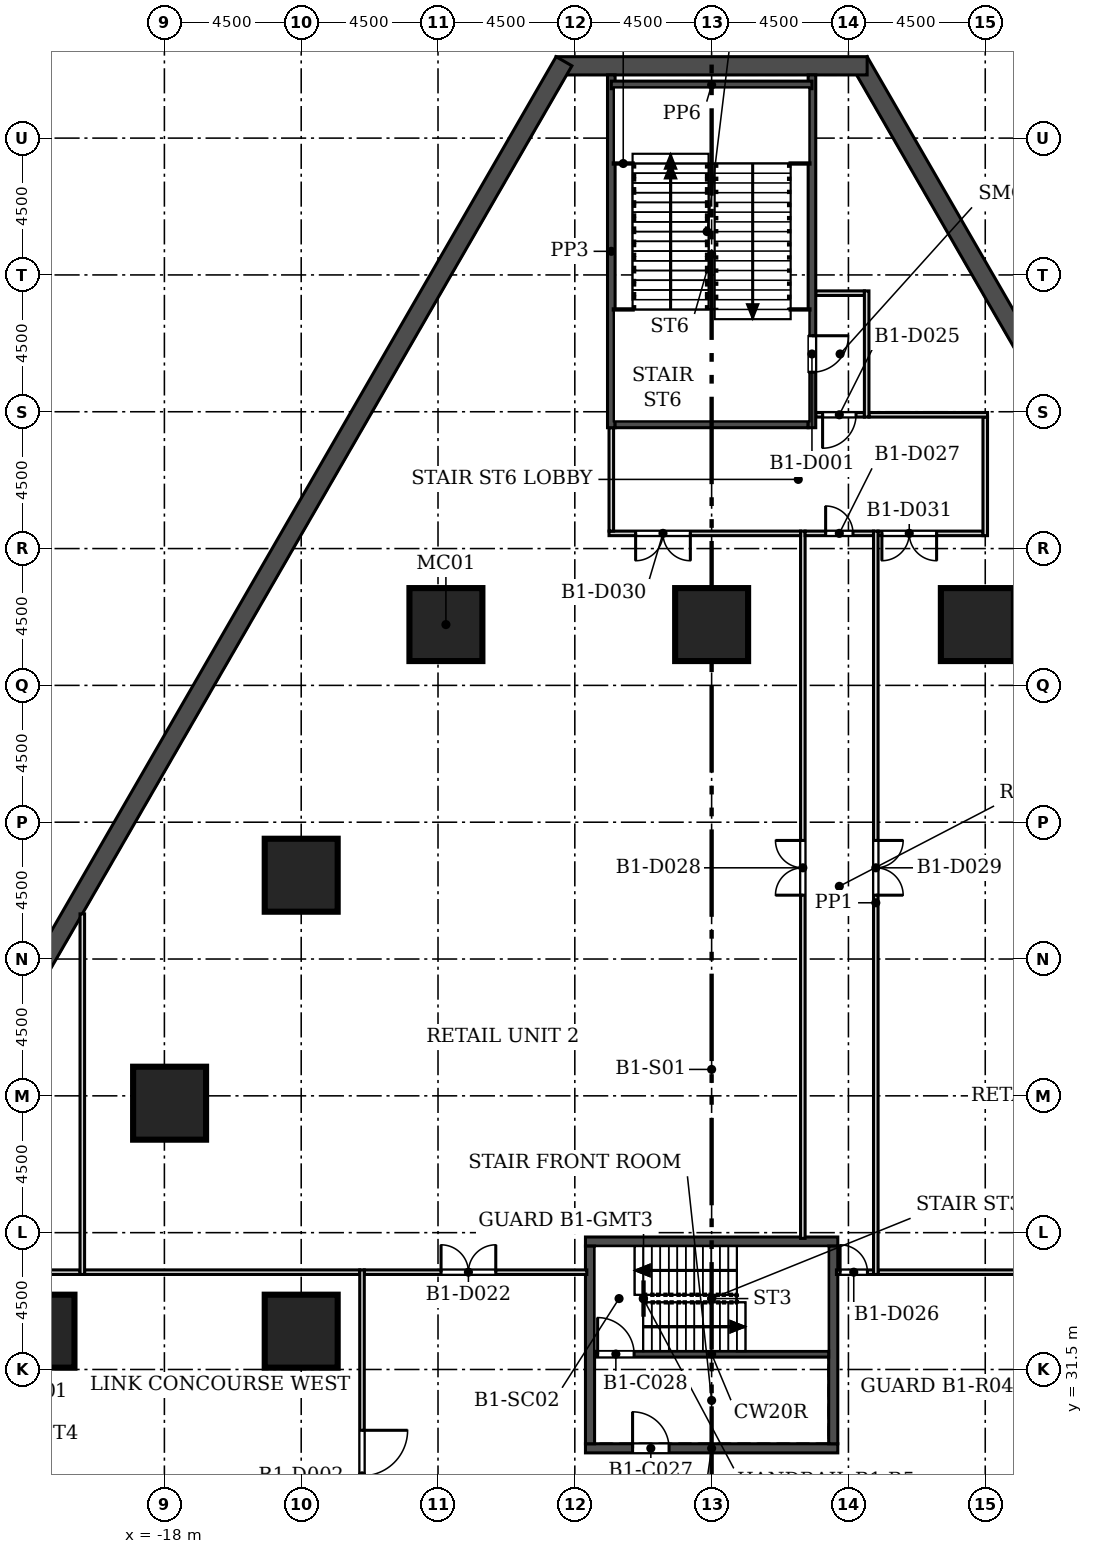
"""IFC4 building model, lengths in metres.
Left out: names, types, materials, properties, quantities, classifications, styles, units other than length and angle.
Written with IfcOpenShell. Run it as: python <this file> out.ifc"""

import sys

from ifc_helpers import new_model, si_unit, direction, frame, frame_2d, origin, origin_2d, place, context, subcontext, project, spatial, rectangle, extrude, element, fill, save


model = new_model("IFC4")
c1 = context("Model", 3, precision=1e-05, world=origin(), true_north=direction((0.0, 1.0)))
c2 = subcontext(c1, "Body", "Model", "MODEL_VIEW")
j1 = project(units=[si_unit("LENGTHUNIT", "METRE"), si_unit("PLANEANGLEUNIT", "RADIAN")], contexts=[c1])
p1 = place(None, origin())
s1 = spatial("IfcSite", under=j1, at=p1, CompositionType="ELEMENT")
p2 = place(p1, origin())
s2 = spatial("IfcBuilding", under=s1, at=p2, CompositionType="ELEMENT")
p3 = place(p2, frame((0.0, 0.0, -8.0)))
s3 = spatial("IfcBuildingStorey", under=s2, at=p3, CompositionType="ELEMENT", Elevation=-8.0)
p4 = place(p3, frame((42.971, 8.51, 0.0), z_axis=(0.0, 0.0, 1.0), x_axis=(-0.499999312333, 0.866025800809, 0.0)))
e1 = element("IfcWall", 1, at=p4, inside=s3, PredefinedType="SOLIDWALL", context=c2, shape_type="SweptSolid", body=[
    extrude(rectangle(XDim=76.231, YDim=0.6, at=frame_2d((38.115, 0.0))), origin(), (0.0, 0.0, 1.0), 7.6),
])
p5 = place(p3, frame((5.115, 74.378, 0.0), z_axis=(0.0, 0.0, 1.0), x_axis=(-1.0, 0.0, 0.0)))
e2 = element("IfcWall", 2, at=p5, inside=s3, PredefinedType="SOLIDWALL", context=c2, shape_type="SweptSolid", body=[
    extrude(rectangle(XDim=10.231, YDim=0.6, at=frame_2d((5.115, 0.0))), origin(), (0.0, 0.0, 1.0), 7.6),
])
p6 = place(p3, frame((-4.856, 74.528, 0.0), z_axis=(0.0, 0.0, 1.0), x_axis=(-0.499999312333, -0.866025800809, 0.0)))
e3 = element("IfcWall", 3, at=p6, inside=s3, PredefinedType="SOLIDWALL", context=c2, shape_type="SweptSolid", body=[
    extrude(rectangle(XDim=76.231, YDim=0.6, at=frame_2d((38.115, 0.0))), origin(), (0.0, 0.0, 1.0), 7.6),
])
for number, where, z_axis, x_axis in (
    (4, (-8.74, 56.0, 0.0), (0.0, 0.0, 1.0), (1.0, 0.0, 0.0)),
    (5, (8.74, 56.0, 0.0), (0.0, 0.0, 1.0), (1.0, 0.0, 0.0)),
    (6, (-22.158, 32.76, 0.0), (0.0, 0.0, 1.0), (1.0, 0.0, 0.0)),
    (7, (-13.5, 47.756, 0.0), (0.0, 0.0, 1.0), (1.0, 0.0, 0.0)),
    (8, (-13.5, 32.76, 0.0), (0.0, 0.0, 1.0), (1.0, 0.0, 0.0)),
    (9, (0.0, 56.0, 0.0), (0.0, 0.0, 1.0), (1.0, 0.0, 0.0)),
    (10, (-17.829, 40.258, 0.0), (0.0, 0.0, 1.0), (1.0, 0.0, 0.0)),
):
    element("IfcColumn", number, at=place(p3, frame(where, z_axis=z_axis, x_axis=x_axis)), inside=s3, PredefinedType="COLUMN", context=c2, shape_type="SweptSolid", body=[
        extrude(rectangle(XDim=2.4, YDim=2.4, at=origin_2d()), origin(), (0.0, 0.0, 1.0), 8.0),
    ])
p7 = place(p3, frame((-4.15, 28.907, -0.35), z_axis=(0.0, 0.0, 1.0), x_axis=(1.0, 0.0, 0.0)))
e11 = element("IfcWall", 11, at=p7, inside=s3, PredefinedType="SOLIDWALL", context=c2, shape_type="SweptSolid", body=[
    extrude(rectangle(XDim=8.3, YDim=0.3, at=frame_2d((4.15, 0.0))), origin(), (0.0, 0.0, 1.0), 7.95),
])
p8 = place(p7, frame((1.55, 0.0, 0.35)))
e12 = element("IfcOpeningElement", 12, at=p8, cuts=e11, PredefinedType="OPENING", context=c2, shape_type="SweptSolid", body=[
    extrude(rectangle(XDim=1.2, YDim=2.1, at=frame_2d((0.6, 1.05))), frame((0.0, 0.16, 0.0), z_axis=(0.0, -1.0, 0.0), x_axis=(1.0, 0.0, 0.0)), (0.0, 0.0, 1.0), 0.32),
])
p9 = place(p3, frame((-4.15, 35.707, -0.35), z_axis=(0.0, 0.0, 1.0), x_axis=(1.0, 0.0, 0.0)))
e13 = element("IfcWall", 13, at=p9, inside=s3, PredefinedType="SOLIDWALL", context=c2, shape_type="SweptSolid", body=[
    extrude(rectangle(XDim=8.3, YDim=0.3, at=frame_2d((4.15, 0.0))), origin(), (0.0, 0.0, 1.0), 7.95),
])
for number, where, z_axis, x_axis in (
    (14, (-4.0, 29.057, -0.35), (0.0, 0.0, 1.0), (0.0, 1.0, 0.0)),
    (15, (4.0, 29.057, -0.35), (0.0, 0.0, 1.0), (0.0, 1.0, 0.0)),
):
    element("IfcWall", number, at=place(p3, frame(where, z_axis=z_axis, x_axis=x_axis)), inside=s3, PredefinedType="SOLIDWALL", context=c2, shape_type="SweptSolid", body=[
        extrude(rectangle(XDim=6.5, YDim=0.3, at=frame_2d((3.25, 0.0))), origin(), (0.0, 0.0, 1.0), 7.95),
    ])
p10 = place(p3, frame((-3.85, 32.007, -0.35), z_axis=(0.0, 0.0, 1.0), x_axis=(1.0, 0.0, 0.0)))
e16 = element("IfcWall", 16, at=p10, inside=s3, PredefinedType="SOLIDWALL", context=c2, shape_type="SweptSolid", body=[
    extrude(rectangle(XDim=7.7, YDim=0.2, at=frame_2d((3.85, 0.0))), origin(), (0.0, 0.0, 1.0), 7.95),
])
p11 = place(p10, frame((0.1, 0.0, 0.35)))
e17 = element("IfcOpeningElement", 17, at=p11, cuts=e16, PredefinedType="OPENING", context=c2, shape_type="SweptSolid", body=[
    extrude(rectangle(XDim=1.2, YDim=2.1, at=frame_2d((0.6, 1.05))), frame((0.0, 0.11, 0.0), z_axis=(0.0, -1.0, 0.0), x_axis=(1.0, 0.0, 0.0)), (0.0, 0.0, 1.0), 0.22),
])
p12 = place(p3, frame((-20.775, 34.7, 0.0), z_axis=(0.0, 0.0, 1.0), x_axis=(-1.0, 0.0, 0.0)))
e18 = element("IfcWall", 18, at=p12, inside=s3, PredefinedType="PARTITIONING", context=c2, shape_type="SweptSolid", body=[
    extrude(rectangle(XDim=6.729, YDim=0.15, at=frame_2d((3.365, 0.0))), origin(), (0.0, 0.0, 1.0), 7.6),
])
p13 = place(p12, frame((3.225, 0.0, 0.0)))
e19 = element("IfcOpeningElement", 19, at=p13, cuts=e18, PredefinedType="OPENING", context=c2, shape_type="SweptSolid", body=[
    extrude(rectangle(XDim=1.8, YDim=2.1, at=frame_2d((0.9, 1.05))), frame((0.0, 0.085, 0.0), z_axis=(0.0, -1.0, 0.0), x_axis=(1.0, 0.0, 0.0)), (0.0, 0.0, 1.0), 0.17),
])
p14 = place(p3, frame((-11.575, 34.7, 0.0), z_axis=(0.0, 0.0, 1.0), x_axis=(-1.0, 0.0, 0.0)))
e20 = element("IfcWall", 20, at=p14, inside=s3, PredefinedType="PARTITIONING", context=c2, shape_type="SweptSolid", body=[
    extrude(rectangle(XDim=9.05, YDim=0.15, at=frame_2d((4.525, 0.0))), origin(), (0.0, 0.0, 1.0), 7.6),
])
p15 = place(p3, frame((-4.105, 34.7, 0.0), z_axis=(0.0, 0.0, 1.0), x_axis=(-1.0, 0.0, 0.0)))
e21 = element("IfcWall", 21, at=p15, inside=s3, PredefinedType="PARTITIONING", context=c2, shape_type="SweptSolid", body=[
    extrude(rectangle(XDim=7.32, YDim=0.15, at=frame_2d((3.66, 0.0))), origin(), (0.0, 0.0, 1.0), 7.6),
])
p16 = place(p15, frame((2.995, 0.0, 0.0)))
e22 = element("IfcOpeningElement", 22, at=p16, cuts=e21, PredefinedType="OPENING", context=c2, shape_type="SweptSolid", body=[
    extrude(rectangle(XDim=1.8, YDim=2.1, at=frame_2d((0.9, 1.05))), frame((0.0, 0.085, 0.0), z_axis=(0.0, -1.0, 0.0), x_axis=(1.0, 0.0, 0.0)), (0.0, 0.0, 1.0), 0.17),
])
p17 = place(p3, frame((5.325, 34.7, 0.0), z_axis=(0.0, 0.0, 1.0), x_axis=(-1.0, 0.0, 0.0)))
e23 = element("IfcWall", 23, at=p17, inside=s3, PredefinedType="PARTITIONING", context=c2, shape_type="SweptSolid", body=[
    extrude(rectangle(XDim=1.22, YDim=0.15, at=frame_2d((0.61, 0.0))), origin(), (0.0, 0.0, 1.0), 7.6),
])
p18 = place(p17, frame((0.2, 0.0, 0.0)))
e24 = element("IfcOpeningElement", 24, at=p18, cuts=e23, PredefinedType="OPENING", context=c2, shape_type="SweptSolid", body=[
    extrude(rectangle(XDim=0.9, YDim=2.1, at=frame_2d((0.45, 1.05))), frame((0.0, 0.085, 0.0), z_axis=(0.0, -1.0, 0.0), x_axis=(1.0, 0.0, 0.0)), (0.0, 0.0, 1.0), 0.17),
])
p19 = place(p3, frame((11.425, 34.7, 0.0), z_axis=(0.0, 0.0, 1.0), x_axis=(-1.0, 0.0, 0.0)))
e25 = element("IfcWall", 25, at=p19, inside=s3, PredefinedType="PARTITIONING", context=c2, shape_type="SweptSolid", body=[
    extrude(rectangle(XDim=5.95, YDim=0.15, at=frame_2d((2.975, 0.0))), origin(), (0.0, 0.0, 1.0), 7.6),
])
p20 = place(p3, frame((-11.5, 34.775, 0.0), z_axis=(0.0, 0.0, 1.0), x_axis=(0.0, -1.0, 0.0)))
e26 = element("IfcWall", 26, at=p20, inside=s3, PredefinedType="PARTITIONING", context=c2, shape_type="SweptSolid", body=[
    extrude(rectangle(XDim=15.85, YDim=0.15, at=frame_2d((7.925, 0.0))), origin(), (0.0, 0.0, 1.0), 7.6),
])
p21 = place(p20, frame((5.275, 0.0, 0.0)))
e27 = element("IfcOpeningElement", 27, at=p21, cuts=e26, PredefinedType="OPENING", context=c2, shape_type="SweptSolid", body=[
    extrude(rectangle(XDim=3.0, YDim=2.4, at=frame_2d((1.5, 1.2))), frame((0.0, 0.085, 0.0), z_axis=(0.0, -1.0, 0.0), x_axis=(1.0, 0.0, 0.0)), (0.0, 0.0, 1.0), 0.17),
])
p22 = place(p3, frame((3.0, 35.812, 0.0), z_axis=(0.0, 0.0, 1.0), x_axis=(0.0, 1.0, 0.0)))
e28 = element("IfcWall", 28, at=p22, inside=s3, PredefinedType="PARTITIONING", context=c2, shape_type="SweptSolid", body=[
    extrude(rectangle(XDim=23.263, YDim=0.15, at=frame_2d((11.631, 0.0))), origin(), (0.0, 0.0, 1.0), 7.6),
])
p23 = place(p22, frame((11.288, 0.0, 0.0)))
e29 = element("IfcOpeningElement", 29, at=p23, cuts=e28, PredefinedType="OPENING", context=c2, shape_type="SweptSolid", body=[
    extrude(rectangle(XDim=1.8, YDim=2.1, at=frame_2d((0.9, 1.05))), frame((0.0, 0.085, 0.0), z_axis=(0.0, -1.0, 0.0), x_axis=(1.0, 0.0, 0.0)), (0.0, 0.0, 1.0), 0.17),
])
p24 = place(p3, frame((-20.7, 46.485, 0.0), z_axis=(0.0, 0.0, 1.0), x_axis=(0.0, -1.0, 0.0)))
e30 = element("IfcWall", 30, at=p24, inside=s3, PredefinedType="PARTITIONING", context=c2, shape_type="SweptSolid", body=[
    extrude(rectangle(XDim=11.86, YDim=0.15, at=frame_2d((5.93, 0.0))), origin(), (0.0, 0.0, 1.0), 7.6),
])
p25 = place(p3, frame((2.925, 59.0, 0.0), z_axis=(0.0, 0.0, 1.0), x_axis=(-1.0, 0.0, 0.0)))
e31 = element("IfcWall", 31, at=p25, inside=s3, PredefinedType="PARTITIONING", context=c2, shape_type="SweptSolid", body=[
    extrude(rectangle(XDim=6.3, YDim=0.15, at=frame_2d((3.15, 0.0))), origin(), (0.0, 0.0, 1.0), 7.6),
])
p26 = place(p25, frame((3.625, 0.0, 0.0)))
e32 = element("IfcOpeningElement", 32, at=p26, cuts=e31, PredefinedType="OPENING", context=c2, shape_type="SweptSolid", body=[
    extrude(rectangle(XDim=1.8, YDim=2.1, at=frame_2d((0.9, 1.05))), frame((0.0, 0.085, 0.0), z_axis=(0.0, -1.0, 0.0), x_axis=(1.0, 0.0, 0.0)), (0.0, 0.0, 1.0), 0.17),
])
p27 = place(p3, frame((5.325, 59.0, 0.0), z_axis=(0.0, 0.0, 1.0), x_axis=(-1.0, 0.0, 0.0)))
e33 = element("IfcWall", 33, at=p27, inside=s3, PredefinedType="PARTITIONING", context=c2, shape_type="SweptSolid", body=[
    extrude(rectangle(XDim=2.25, YDim=0.15, at=frame_2d((1.125, 0.0))), origin(), (0.0, 0.0, 1.0), 7.6),
])
p28 = place(p27, frame((0.675, 0.0, 0.0)))
e34 = element("IfcOpeningElement", 34, at=p28, cuts=e33, PredefinedType="OPENING", context=c2, shape_type="SweptSolid", body=[
    extrude(rectangle(XDim=0.9, YDim=2.1, at=frame_2d((0.45, 1.05))), frame((0.0, 0.085, 0.0), z_axis=(0.0, -1.0, 0.0), x_axis=(1.0, 0.0, 0.0)), (0.0, 0.0, 1.0), 0.17),
])
p29 = place(p3, frame((8.925, 59.0, 0.0), z_axis=(0.0, 0.0, 1.0), x_axis=(-1.0, 0.0, 0.0)))
e35 = element("IfcWall", 35, at=p29, inside=s3, PredefinedType="PARTITIONING", context=c2, shape_type="SweptSolid", body=[
    extrude(rectangle(XDim=3.45, YDim=0.15, at=frame_2d((1.725, 0.0))), origin(), (0.0, 0.0, 1.0), 7.6),
])
p30 = place(p29, frame((1.525, 0.0, 0.0)))
e36 = element("IfcOpeningElement", 36, at=p30, cuts=e35, PredefinedType="OPENING", context=c2, shape_type="SweptSolid", body=[
    extrude(rectangle(XDim=1.8, YDim=2.1, at=frame_2d((0.9, 1.05))), frame((0.0, 0.085, 0.0), z_axis=(0.0, -1.0, 0.0), x_axis=(1.0, 0.0, 0.0)), (0.0, 0.0, 1.0), 0.17),
])
p31 = place(p3, frame((-3.3, 59.075, 0.0), z_axis=(0.0, 0.0, 1.0), x_axis=(0.0, 1.0, 0.0)))
e37 = element("IfcWall", 37, at=p31, inside=s3, PredefinedType="PARTITIONING", context=c2, shape_type="SweptSolid", body=[
    extrude(rectangle(XDim=3.4, YDim=0.15, at=frame_2d((1.7, 0.0))), origin(), (0.0, 0.0, 1.0), 7.6),
])
p32 = place(p3, frame((5.4, 59.075, 0.0), z_axis=(0.0, 0.0, 1.0), x_axis=(0.0, -1.0, 0.0)))
e38 = element("IfcWall", 38, at=p32, inside=s3, PredefinedType="PARTITIONING", context=c2, shape_type="SweptSolid", body=[
    extrude(rectangle(XDim=24.45, YDim=0.15, at=frame_2d((12.225, 0.0))), origin(), (0.0, 0.0, 1.0), 7.6),
])
p33 = place(p32, frame((10.175, 0.0, 0.0)))
e39 = element("IfcOpeningElement", 39, at=p33, cuts=e38, PredefinedType="OPENING", context=c2, shape_type="SweptSolid", body=[
    extrude(rectangle(XDim=1.8, YDim=2.1, at=frame_2d((0.9, 1.05))), frame((0.0, 0.085, 0.0), z_axis=(0.0, -1.0, 0.0), x_axis=(1.0, 0.0, 0.0)), (0.0, 0.0, 1.0), 0.17),
])
p34 = place(p3, frame((-3.3, 62.475, 0.0), z_axis=(0.0, 0.0, 1.0), x_axis=(0.0, 1.0, 0.0)))
e40 = element("IfcWall", 40, at=p34, inside=s3, PredefinedType="SOLIDWALL", context=c2, shape_type="SweptSolid", body=[
    extrude(rectangle(XDim=11.603, YDim=0.25, at=frame_2d((5.802, 0.0))), origin(), (0.0, 0.0, 1.0), 7.6),
])
p35 = place(p3, frame((3.175, 62.6, 0.0), z_axis=(0.0, 0.0, 1.0), x_axis=(-1.0, 0.0, 0.0)))
e41 = element("IfcWall", 41, at=p35, inside=s3, PredefinedType="SOLIDWALL", context=c2, shape_type="SweptSolid", body=[
    extrude(rectangle(XDim=6.35, YDim=0.25, at=frame_2d((3.175, 0.0))), origin(), (0.0, 0.0, 1.0), 7.6),
])
p36 = place(p3, frame((9.0, 62.825, 0.0), z_axis=(0.0, 0.0, 1.0), x_axis=(0.0, -1.0, 0.0)))
e42 = element("IfcWall", 42, at=p36, inside=s3, PredefinedType="PARTITIONING", context=c2, shape_type="SweptSolid", body=[
    extrude(rectangle(XDim=3.9, YDim=0.15, at=frame_2d((1.95, 0.0))), origin(), (0.0, 0.0, 1.0), 7.6),
])
p37 = place(p3, frame((5.025, 62.9, 0.0), z_axis=(0.0, 0.0, 1.0), x_axis=(-1.0, 0.0, 0.0)))
e43 = element("IfcWall", 43, at=p37, inside=s3, PredefinedType="PARTITIONING", context=c2, shape_type="SweptSolid", body=[
    extrude(rectangle(XDim=1.6, YDim=0.15, at=frame_2d((0.8, 0.0))), origin(), (0.0, 0.0, 1.0), 7.6),
])
p38 = place(p37, frame((0.275, 0.0, 0.0)))
e44 = element("IfcOpeningElement", 44, at=p38, cuts=e43, PredefinedType="OPENING", context=c2, shape_type="SweptSolid", body=[
    extrude(rectangle(XDim=1.1, YDim=2.1, at=frame_2d((0.55, 1.05))), frame((0.0, 0.085, 0.0), z_axis=(0.0, -1.0, 0.0), x_axis=(1.0, 0.0, 0.0)), (0.0, 0.0, 1.0), 0.17),
])
p39 = place(p3, frame((5.175, 62.9, 0.0), z_axis=(0.0, 0.0, 1.0), x_axis=(1.0, 0.0, 0.0)))
e45 = element("IfcWall", 45, at=p39, inside=s3, PredefinedType="PARTITIONING", context=c2, shape_type="SweptSolid", body=[
    extrude(rectangle(XDim=3.9, YDim=0.15, at=frame_2d((1.95, 0.0))), origin(), (0.0, 0.0, 1.0), 7.6),
])
p40 = place(p3, frame((3.425, 66.9, 0.0), z_axis=(0.0, 0.0, 1.0), x_axis=(1.0, 0.0, 0.0)))
e46 = element("IfcWall", 46, at=p40, inside=s3, PredefinedType="PARTITIONING", context=c2, shape_type="SweptSolid", body=[
    extrude(rectangle(XDim=1.6, YDim=0.15, at=frame_2d((0.8, 0.0))), origin(), (0.0, 0.0, 1.0), 7.6),
])
p41 = place(p3, frame((5.1, 66.975, 0.0), z_axis=(0.0, 0.0, 1.0), x_axis=(0.0, -1.0, 0.0)))
e47 = element("IfcWall", 47, at=p41, inside=s3, PredefinedType="PARTITIONING", context=c2, shape_type="SweptSolid", body=[
    extrude(rectangle(XDim=4.15, YDim=0.15, at=frame_2d((2.075, 0.0))), origin(), (0.0, 0.0, 1.0), 7.6),
])
p42 = place(p3, frame((3.3, 74.078, 0.0), z_axis=(0.0, 0.0, 1.0), x_axis=(0.0, -1.0, 0.0)))
e48 = element("IfcWall", 48, at=p42, inside=s3, PredefinedType="SOLIDWALL", context=c2, shape_type="SweptSolid", body=[
    extrude(rectangle(XDim=11.603, YDim=0.25, at=frame_2d((5.802, 0.0))), origin(), (0.0, 0.0, 1.0), 7.6),
])
p43 = place(p42, frame((8.578, 0.0, 0.0)))
e49 = element("IfcOpeningElement", 49, at=p43, cuts=e48, PredefinedType="OPENING", context=c2, shape_type="SweptSolid", body=[
    extrude(rectangle(XDim=1.2, YDim=2.1, at=frame_2d((0.6, 1.05))), frame((0.0, 0.135, 0.0), z_axis=(0.0, -1.0, 0.0), x_axis=(1.0, 0.0, 0.0)), (0.0, 0.0, 1.0), 0.27),
])
p44 = place(p3, frame((-3.3, 73.75, 0.0), z_axis=(0.0, 0.0, 1.0), x_axis=(1.0, 0.0, 0.0)))
e50 = element("IfcWall", 50, at=p44, inside=s3, PredefinedType="SOLIDWALL", context=c2, shape_type="SweptSolid", body=[
    extrude(rectangle(XDim=6.6, YDim=0.25, at=frame_2d((3.3, 0.0))), origin(), (0.0, 0.0, 1.0), 7.6),
])
p45 = place(p8, origin())
e51 = element("IfcDoor", 51, at=p45, inside=s3, OperationType="SINGLE_SWING_LEFT", PredefinedType="DOOR", context=c2, shape_type="SweptSolid", body=[
    extrude(rectangle(XDim=1.2, YDim=2.1, at=frame_2d((0.6, 1.05))), frame((0.0, 0.025, 0.0), z_axis=(0.0, -1.0, 0.0), x_axis=(1.0, 0.0, 0.0)), (0.0, 0.0, 1.0), 0.05),
])
fill(e12, e51)
p46 = place(p11, origin())
e52 = element("IfcDoor", 52, at=p46, inside=s3, OperationType="SINGLE_SWING_LEFT", PredefinedType="DOOR", context=c2, shape_type="SweptSolid", body=[
    extrude(rectangle(XDim=1.2, YDim=2.1, at=frame_2d((0.6, 1.05))), frame((0.0, 0.025, 0.0), z_axis=(0.0, -1.0, 0.0), x_axis=(1.0, 0.0, 0.0)), (0.0, 0.0, 1.0), 0.05),
])
fill(e17, e52)
p47 = place(p43, origin())
e53 = element("IfcDoor", 53, at=p47, inside=s3, OperationType="SINGLE_SWING_LEFT", PredefinedType="DOOR", context=c2, shape_type="SweptSolid", body=[
    extrude(rectangle(XDim=1.2, YDim=2.1, at=frame_2d((0.6, 1.05))), frame((0.0, 0.025, 0.0), z_axis=(0.0, -1.0, 0.0), x_axis=(1.0, 0.0, 0.0)), (0.0, 0.0, 1.0), 0.05),
])
fill(e49, e53)
p48 = place(p21, origin())
e54 = element("IfcDoor", 54, at=p48, inside=s3, OperationType="DOUBLE_DOOR_SINGLE_SWING", PredefinedType="DOOR", context=c2, shape_type="SweptSolid", body=[
    extrude(rectangle(XDim=3.0, YDim=2.4, at=frame_2d((1.5, 1.2))), frame((0.0, 0.025, 0.0), z_axis=(0.0, -1.0, 0.0), x_axis=(1.0, 0.0, 0.0)), (0.0, 0.0, 1.0), 0.05),
])
fill(e27, e54)
p49 = place(p16, frame((1.8, 0.0, 0.0), z_axis=(0.0, 0.0, 1.0), x_axis=(-1.0, 0.0, 0.0)))
e55 = element("IfcDoor", 55, at=p49, inside=s3, OperationType="DOUBLE_DOOR_SINGLE_SWING", PredefinedType="DOOR", context=c2, shape_type="SweptSolid", body=[
    extrude(rectangle(XDim=1.8, YDim=2.1, at=frame_2d((0.9, 1.05))), frame((0.0, 0.025, 0.0), z_axis=(0.0, -1.0, 0.0), x_axis=(1.0, 0.0, 0.0)), (0.0, 0.0, 1.0), 0.05),
])
fill(e22, e55)
p50 = place(p38, origin())
e56 = element("IfcDoor", 56, at=p50, inside=s3, OperationType="SINGLE_SWING_RIGHT", PredefinedType="DOOR", context=c2, shape_type="SweptSolid", body=[
    extrude(rectangle(XDim=1.1, YDim=2.1, at=frame_2d((0.55, 1.05))), frame((0.0, 0.025, 0.0), z_axis=(0.0, -1.0, 0.0), x_axis=(1.0, 0.0, 0.0)), (0.0, 0.0, 1.0), 0.05),
])
fill(e44, e56)
p51 = place(p18, frame((0.9, 0.0, 0.0), z_axis=(0.0, 0.0, 1.0), x_axis=(-1.0, 0.0, 0.0)))
e57 = element("IfcDoor", 57, at=p51, inside=s3, OperationType="SINGLE_SWING_LEFT", PredefinedType="DOOR", context=c2, shape_type="SweptSolid", body=[
    extrude(rectangle(XDim=0.9, YDim=2.1, at=frame_2d((0.45, 1.05))), frame((0.0, 0.025, 0.0), z_axis=(0.0, -1.0, 0.0), x_axis=(1.0, 0.0, 0.0)), (0.0, 0.0, 1.0), 0.05),
])
fill(e24, e57)
p52 = place(p28, frame((0.9, 0.0, 0.0), z_axis=(0.0, 0.0, 1.0), x_axis=(-1.0, 0.0, 0.0)))
e58 = element("IfcDoor", 58, at=p52, inside=s3, OperationType="SINGLE_SWING_LEFT", PredefinedType="DOOR", context=c2, shape_type="SweptSolid", body=[
    extrude(rectangle(XDim=0.9, YDim=2.1, at=frame_2d((0.45, 1.05))), frame((0.0, 0.025, 0.0), z_axis=(0.0, -1.0, 0.0), x_axis=(1.0, 0.0, 0.0)), (0.0, 0.0, 1.0), 0.05),
])
fill(e34, e58)
p53 = place(p23, origin())
e59 = element("IfcDoor", 59, at=p53, inside=s3, OperationType="DOUBLE_DOOR_SINGLE_SWING", PredefinedType="DOOR", context=c2, shape_type="SweptSolid", body=[
    extrude(rectangle(XDim=1.8, YDim=2.1, at=frame_2d((0.9, 1.05))), frame((0.0, 0.025, 0.0), z_axis=(0.0, -1.0, 0.0), x_axis=(1.0, 0.0, 0.0)), (0.0, 0.0, 1.0), 0.05),
])
fill(e29, e59)
p54 = place(p33, origin())
e60 = element("IfcDoor", 60, at=p54, inside=s3, OperationType="DOUBLE_DOOR_SINGLE_SWING", PredefinedType="DOOR", context=c2, shape_type="SweptSolid", body=[
    extrude(rectangle(XDim=1.8, YDim=2.1, at=frame_2d((0.9, 1.05))), frame((0.0, 0.025, 0.0), z_axis=(0.0, -1.0, 0.0), x_axis=(1.0, 0.0, 0.0)), (0.0, 0.0, 1.0), 0.05),
])
fill(e39, e60)
p55 = place(p26, origin())
e61 = element("IfcDoor", 61, at=p55, inside=s3, OperationType="DOUBLE_DOOR_SINGLE_SWING", PredefinedType="DOOR", context=c2, shape_type="SweptSolid", body=[
    extrude(rectangle(XDim=1.8, YDim=2.1, at=frame_2d((0.9, 1.05))), frame((0.0, 0.025, 0.0), z_axis=(0.0, -1.0, 0.0), x_axis=(1.0, 0.0, 0.0)), (0.0, 0.0, 1.0), 0.05),
])
fill(e32, e61)
p56 = place(p30, origin())
e62 = element("IfcDoor", 62, at=p56, inside=s3, OperationType="DOUBLE_DOOR_SINGLE_SWING", PredefinedType="DOOR", context=c2, shape_type="SweptSolid", body=[
    extrude(rectangle(XDim=1.8, YDim=2.1, at=frame_2d((0.9, 1.05))), frame((0.0, 0.025, 0.0), z_axis=(0.0, -1.0, 0.0), x_axis=(1.0, 0.0, 0.0)), (0.0, 0.0, 1.0), 0.05),
])
fill(e36, e62)
save(model, sys.argv[1])
